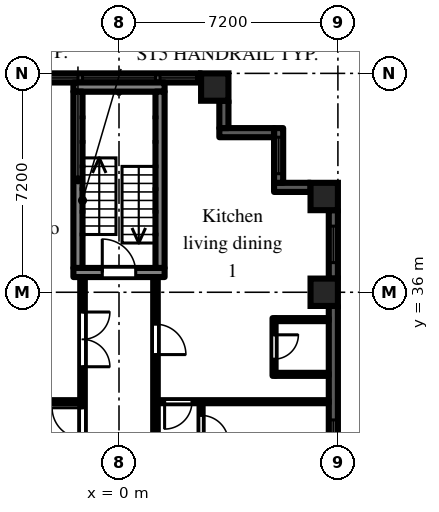
"""IFC4 building model, lengths in metres.
Left out: names, types, materials, properties, quantities, classifications, styles, units other than length and angle.
Written with IfcOpenShell. Run it as: python <this file> out.ifc"""

import sys

from ifc_helpers import new_model, si_unit, direction, frame, frame_2d, origin, origin_2d, place, context, subcontext, project, spatial, rectangle, extrude, element, fill, save


model = new_model("IFC4")
c1 = context("Model", 3, precision=1e-05, world=origin(), true_north=direction((0.0, 1.0)))
c2 = subcontext(c1, "Body", "Model", "MODEL_VIEW")
j1 = project(units=[si_unit("LENGTHUNIT", "METRE"), si_unit("PLANEANGLEUNIT", "RADIAN")], contexts=[c1])
p1 = place(None, origin())
s1 = spatial("IfcSite", under=j1, at=p1, CompositionType="ELEMENT")
p2 = place(p1, origin())
s2 = spatial("IfcBuilding", under=s1, at=p2, CompositionType="ELEMENT")
p3 = place(p2, frame((0.0, 0.0, 59.7)))
s3 = spatial("IfcBuildingStorey", under=s2, at=p3, CompositionType="ELEMENT", Elevation=59.7)
for number, where, z_axis, x_axis in (
    (1, (3.15, 42.75, 0.0), (0.0, 0.0, 1.0), (1.0, 0.0, 0.0)),
    (2, (6.75, 36.0, 0.0), (0.0, 0.0, 1.0), (1.0, 0.0, 0.0)),
    (3, (6.75, 39.15, 0.0), (0.0, 0.0, 1.0), (1.0, 0.0, 0.0)),
):
    element("IfcColumn", number, at=place(p3, frame(where, z_axis=z_axis, x_axis=x_axis)), inside=s3, PredefinedType="COLUMN", context=c2, shape_type="SweptSolid", body=[
        extrude(rectangle(XDim=0.9, YDim=0.9, at=origin_2d()), origin(), (0.0, 0.0, 1.0), 3.0),
    ])
p4 = place(p3, frame((7.05, 29.25, 0.0), z_axis=(0.0, 0.0, 1.0), x_axis=(0.0, 1.0, 0.0)))
e4 = element("IfcWall", 4, at=p4, inside=s3, PredefinedType="SOLIDWALL", context=c2, shape_type="SweptSolid", body=[
    extrude(rectangle(XDim=6.3, YDim=0.3, at=frame_2d((3.15, 0.0))), origin(), (0.0, 0.0, 1.0), 2.1),
])
p5 = place(p4, frame((0.15, 0.0, 0.2)))
e5 = element("IfcOpeningElement", 5, at=p5, cuts=e4, PredefinedType="OPENING", context=c2, shape_type="SweptSolid", body=[
    extrude(rectangle(XDim=2.4, YDim=1.85, at=frame_2d((1.2, 0.925))), frame((0.0, 0.16, 0.0), z_axis=(0.0, -1.0, 0.0), x_axis=(1.0, 0.0, 0.0)), (0.0, 0.0, 1.0), 0.32),
])
p6 = place(p3, frame((7.05, 36.45, 0.0), z_axis=(0.0, 0.0, 1.0), x_axis=(0.0, 1.0, 0.0)))
e6 = element("IfcWall", 6, at=p6, inside=s3, PredefinedType="SOLIDWALL", context=c2, shape_type="SweptSolid", body=[
    extrude(rectangle(XDim=2.25, YDim=0.3, at=frame_2d((1.125, 0.0))), origin(), (0.0, 0.0, 1.0), 2.1),
])
p7 = place(p6, frame((0.525, 0.0, 0.2)))
e7 = element("IfcOpeningElement", 7, at=p7, cuts=e6, PredefinedType="OPENING", context=c2, shape_type="SweptSolid", body=[
    extrude(rectangle(XDim=1.2, YDim=1.85, at=frame_2d((0.6, 0.925))), frame((0.0, 0.16, 0.0), z_axis=(0.0, -1.0, 0.0), x_axis=(1.0, 0.0, 0.0)), (0.0, 0.0, 1.0), 0.32),
])
p8 = place(p3, frame((6.3, 39.45, 0.0), z_axis=(0.0, 0.0, 1.0), x_axis=(-1.0, 0.0, 0.0)))
e8 = element("IfcWall", 8, at=p8, inside=s3, PredefinedType="SOLIDWALL", context=c2, shape_type="SweptSolid", body=[
    extrude(rectangle(XDim=1.2, YDim=0.3, at=frame_2d((0.6, 0.0))), origin(), (0.0, 0.0, 1.0), 2.55),
])
p9 = place(p3, frame((5.25, 39.6, 0.0), z_axis=(0.0, 0.0, 1.0), x_axis=(0.0, 1.0, 0.0)))
e9 = element("IfcWall", 9, at=p9, inside=s3, PredefinedType="SOLIDWALL", context=c2, shape_type="SweptSolid", body=[
    extrude(rectangle(XDim=1.8, YDim=0.3, at=frame_2d((0.9, 0.0))), origin(), (0.0, 0.0, 1.0), 2.55),
])
p10 = place(p9, frame((0.3, 0.0, 0.2)))
e10 = element("IfcOpeningElement", 10, at=p10, cuts=e9, PredefinedType="OPENING", context=c2, shape_type="SweptSolid", body=[
    extrude(rectangle(XDim=1.2, YDim=1.85, at=frame_2d((0.6, 0.925))), frame((0.0, 0.16, 0.0), z_axis=(0.0, -1.0, 0.0), x_axis=(1.0, 0.0, 0.0)), (0.0, 0.0, 1.0), 0.32),
])
p11 = place(p3, frame((5.1, 41.25, 0.0), z_axis=(0.0, 0.0, 1.0), x_axis=(-1.0, 0.0, 0.0)))
e11 = element("IfcWall", 11, at=p11, inside=s3, PredefinedType="SOLIDWALL", context=c2, shape_type="SweptSolid", body=[
    extrude(rectangle(XDim=1.8, YDim=0.3, at=frame_2d((0.9, 0.0))), origin(), (0.0, 0.0, 1.0), 2.55),
])
p12 = place(p3, frame((3.45, 41.4, 0.0), z_axis=(0.0, 0.0, 1.0), x_axis=(0.0, 1.0, 0.0)))
e12 = element("IfcWall", 12, at=p12, inside=s3, PredefinedType="SOLIDWALL", context=c2, shape_type="SweptSolid", body=[
    extrude(rectangle(XDim=0.9, YDim=0.3, at=frame_2d((0.45, 0.0))), origin(), (0.0, 0.0, 1.0), 2.55),
])
p13 = place(p3, frame((2.7, 43.05, 0.0), z_axis=(0.0, 0.0, 1.0), x_axis=(-1.0, 0.0, 0.0)))
e13 = element("IfcWall", 13, at=p13, inside=s3, PredefinedType="SOLIDWALL", context=c2, shape_type="SweptSolid", body=[
    extrude(rectangle(XDim=5.4, YDim=0.3, at=frame_2d((2.7, 0.0))), origin(), (0.0, 0.0, 1.0), 2.1),
])
p14 = place(p13, frame((1.5, 0.0, 0.2)))
e14 = element("IfcOpeningElement", 14, at=p14, cuts=e13, PredefinedType="OPENING", context=c2, shape_type="SweptSolid", body=[
    extrude(rectangle(XDim=2.4, YDim=1.85, at=frame_2d((1.2, 0.925))), frame((0.0, 0.16, 0.0), z_axis=(0.0, -1.0, 0.0), x_axis=(1.0, 0.0, 0.0)), (0.0, 0.0, 1.0), 0.32),
])
p15 = place(p13, frame((0.15, 0.0, 0.2)))
e15 = element("IfcOpeningElement", 15, at=p15, cuts=e13, PredefinedType="OPENING", context=c2, shape_type="SweptSolid", body=[
    extrude(rectangle(XDim=1.2, YDim=1.85, at=frame_2d((0.6, 0.925))), frame((0.0, 0.16, 0.0), z_axis=(0.0, -1.0, 0.0), x_axis=(1.0, 0.0, 0.0)), (0.0, 0.0, 1.0), 0.32),
])
p16 = place(p13, frame((4.05, 0.0, 0.2)))
e16 = element("IfcOpeningElement", 16, at=p16, cuts=e13, PredefinedType="OPENING", context=c2, shape_type="SweptSolid", body=[
    extrude(rectangle(XDim=1.2, YDim=1.85, at=frame_2d((0.6, 0.925))), frame((0.0, 0.16, 0.0), z_axis=(0.0, -1.0, 0.0), x_axis=(1.0, 0.0, 0.0)), (0.0, 0.0, 1.0), 0.32),
])
p17 = place(p3, frame((-1.5, 36.65, 0.0), z_axis=(0.0, 0.0, 1.0), x_axis=(1.0, 0.0, 0.0)))
e17 = element("IfcWall", 17, at=p17, inside=s3, PredefinedType="SHEAR", context=c2, shape_type="SweptSolid", body=[
    extrude(rectangle(XDim=3.0, YDim=0.3, at=frame_2d((1.5, 0.0))), origin(), (0.0, 0.0, 1.0), 2.55),
])
p18 = place(p17, frame((0.95, 0.0, 0.0)))
e18 = element("IfcOpeningElement", 18, at=p18, cuts=e17, PredefinedType="OPENING", context=c2, shape_type="SweptSolid", body=[
    extrude(rectangle(XDim=1.1, YDim=2.1, at=frame_2d((0.55, 1.05))), frame((0.0, 0.16, 0.0), z_axis=(0.0, -1.0, 0.0), x_axis=(1.0, 0.0, 0.0)), (0.0, 0.0, 1.0), 0.32),
])
p19 = place(p3, frame((-1.5, 42.75, 0.0), z_axis=(0.0, 0.0, 1.0), x_axis=(1.0, 0.0, 0.0)))
e19 = element("IfcWall", 19, at=p19, inside=s3, PredefinedType="SHEAR", context=c2, shape_type="SweptSolid", body=[
    extrude(rectangle(XDim=3.0, YDim=0.3, at=frame_2d((1.5, 0.0))), origin(), (0.0, 0.0, 1.0), 2.55),
])
for number, where, z_axis, x_axis in (
    (20, (-1.35, 36.8, 0.0), (0.0, 0.0, 1.0), (0.0, 1.0, 0.0)),
    (21, (1.35, 36.8, 0.0), (0.0, 0.0, 1.0), (0.0, 1.0, 0.0)),
):
    element("IfcWall", number, at=place(p3, frame(where, z_axis=z_axis, x_axis=x_axis)), inside=s3, PredefinedType="SHEAR", context=c2, shape_type="SweptSolid", body=[
        extrude(rectangle(XDim=5.8, YDim=0.3, at=frame_2d((2.9, 0.0))), origin(), (0.0, 0.0, 1.0), 2.55),
    ])
p20 = place(p3, frame((-6.9, 32.4, 0.0), z_axis=(0.0, 0.0, 1.0), x_axis=(1.0, 0.0, 0.0)))
e22 = element("IfcWall", 22, at=p20, inside=s3, PredefinedType="PARTITIONING", context=c2, shape_type="SweptSolid", body=[
    extrude(rectangle(XDim=5.625, YDim=0.1, at=frame_2d((2.812, 0.0))), origin(), (0.0, 0.0, 1.0), 2.55),
])
p21 = place(p3, frame((-1.2, 1.275, 0.0), z_axis=(0.0, 0.0, 1.0), x_axis=(0.0, 1.0, 0.0)))
e23 = element("IfcWall", 23, at=p21, inside=s3, PredefinedType="PARTITIONING", context=c2, shape_type="SweptSolid", body=[
    extrude(rectangle(XDim=35.225, YDim=0.15, at=frame_2d((17.613, 0.0))), origin(), (0.0, 0.0, 1.0), 2.55),
])
p22 = place(p21, frame((2.475, 0.0, 0.0)))
e24 = element("IfcOpeningElement", 24, at=p22, cuts=e23, PredefinedType="OPENING", context=c2, shape_type="SweptSolid", body=[
    extrude(rectangle(XDim=0.9, YDim=2.1, at=frame_2d((0.45, 1.05))), frame((0.0, 0.085, 0.0), z_axis=(0.0, -1.0, 0.0), x_axis=(1.0, 0.0, 0.0)), (0.0, 0.0, 1.0), 0.17),
])
p23 = place(p21, frame((11.275, 0.0, 0.0)))
e25 = element("IfcOpeningElement", 25, at=p23, cuts=e23, PredefinedType="OPENING", context=c2, shape_type="SweptSolid", body=[
    extrude(rectangle(XDim=0.9, YDim=2.1, at=frame_2d((0.45, 1.05))), frame((0.0, 0.085, 0.0), z_axis=(0.0, -1.0, 0.0), x_axis=(1.0, 0.0, 0.0)), (0.0, 0.0, 1.0), 0.17),
])
p24 = place(p21, frame((7.675, 0.0, 0.0)))
e26 = element("IfcOpeningElement", 26, at=p24, cuts=e23, PredefinedType="OPENING", context=c2, shape_type="SweptSolid", body=[
    extrude(rectangle(XDim=0.9, YDim=2.1, at=frame_2d((0.45, 1.05))), frame((0.0, 0.085, 0.0), z_axis=(0.0, -1.0, 0.0), x_axis=(1.0, 0.0, 0.0)), (0.0, 0.0, 1.0), 0.17),
])
p25 = place(p21, frame((19.125, 0.0, 0.0)))
e27 = element("IfcOpeningElement", 27, at=p25, cuts=e23, PredefinedType="OPENING", context=c2, shape_type="SweptSolid", body=[
    extrude(rectangle(XDim=1.0, YDim=2.1, at=frame_2d((0.5, 1.05))), frame((0.0, 0.085, 0.0), z_axis=(0.0, -1.0, 0.0), x_axis=(1.0, 0.0, 0.0)), (0.0, 0.0, 1.0), 0.17),
])
p26 = place(p21, frame((21.675, 0.0, 0.0)))
e28 = element("IfcOpeningElement", 28, at=p26, cuts=e23, PredefinedType="OPENING", context=c2, shape_type="SweptSolid", body=[
    extrude(rectangle(XDim=0.9, YDim=2.1, at=frame_2d((0.45, 1.05))), frame((0.0, 0.085, 0.0), z_axis=(0.0, -1.0, 0.0), x_axis=(1.0, 0.0, 0.0)), (0.0, 0.0, 1.0), 0.17),
])
p27 = place(p21, frame((29.925, 0.0, 0.0)))
e29 = element("IfcOpeningElement", 29, at=p27, cuts=e23, PredefinedType="OPENING", context=c2, shape_type="SweptSolid", body=[
    extrude(rectangle(XDim=1.0, YDim=2.1, at=frame_2d((0.5, 1.05))), frame((0.0, 0.085, 0.0), z_axis=(0.0, -1.0, 0.0), x_axis=(1.0, 0.0, 0.0)), (0.0, 0.0, 1.0), 0.17),
])
p28 = place(p21, frame((32.275, 0.0, 0.0)))
e30 = element("IfcOpeningElement", 30, at=p28, cuts=e23, PredefinedType="OPENING", context=c2, shape_type="SweptSolid", body=[
    extrude(rectangle(XDim=1.8, YDim=2.1, at=frame_2d((0.9, 1.05))), frame((0.0, 0.085, 0.0), z_axis=(0.0, -1.0, 0.0), x_axis=(1.0, 0.0, 0.0)), (0.0, 0.0, 1.0), 0.17),
])
p29 = place(p3, frame((1.2, 1.125, 0.0), z_axis=(0.0, 0.0, 1.0), x_axis=(0.0, 1.0, 0.0)))
e31 = element("IfcWall", 31, at=p29, inside=s3, PredefinedType="PARTITIONING", context=c2, shape_type="SweptSolid", body=[
    extrude(rectangle(XDim=35.375, YDim=0.15, at=frame_2d((17.688, 0.0))), origin(), (0.0, 0.0, 1.0), 2.55),
])
p30 = place(p29, frame((2.625, 0.0, 0.0)))
e32 = element("IfcOpeningElement", 32, at=p30, cuts=e31, PredefinedType="OPENING", context=c2, shape_type="SweptSolid", body=[
    extrude(rectangle(XDim=0.9, YDim=2.1, at=frame_2d((0.45, 1.05))), frame((0.0, 0.085, 0.0), z_axis=(0.0, -1.0, 0.0), x_axis=(1.0, 0.0, 0.0)), (0.0, 0.0, 1.0), 0.17),
])
p31 = place(p29, frame((7.425, 0.0, 0.0)))
e33 = element("IfcOpeningElement", 33, at=p31, cuts=e31, PredefinedType="OPENING", context=c2, shape_type="SweptSolid", body=[
    extrude(rectangle(XDim=0.9, YDim=2.1, at=frame_2d((0.45, 1.05))), frame((0.0, 0.085, 0.0), z_axis=(0.0, -1.0, 0.0), x_axis=(1.0, 0.0, 0.0)), (0.0, 0.0, 1.0), 0.17),
])
p32 = place(p29, frame((13.725, 0.0, 0.0)))
e34 = element("IfcOpeningElement", 34, at=p32, cuts=e31, PredefinedType="OPENING", context=c2, shape_type="SweptSolid", body=[
    extrude(rectangle(XDim=0.9, YDim=2.1, at=frame_2d((0.45, 1.05))), frame((0.0, 0.085, 0.0), z_axis=(0.0, -1.0, 0.0), x_axis=(1.0, 0.0, 0.0)), (0.0, 0.0, 1.0), 0.17),
])
p33 = place(p29, frame((15.525, 0.0, 0.0)))
e35 = element("IfcOpeningElement", 35, at=p33, cuts=e31, PredefinedType="OPENING", context=c2, shape_type="SweptSolid", body=[
    extrude(rectangle(XDim=0.9, YDim=2.1, at=frame_2d((0.45, 1.05))), frame((0.0, 0.085, 0.0), z_axis=(0.0, -1.0, 0.0), x_axis=(1.0, 0.0, 0.0)), (0.0, 0.0, 1.0), 0.17),
])
p34 = place(p29, frame((32.825, 0.0, 0.0)))
e36 = element("IfcOpeningElement", 36, at=p34, cuts=e31, PredefinedType="OPENING", context=c2, shape_type="SweptSolid", body=[
    extrude(rectangle(XDim=1.0, YDim=2.1, at=frame_2d((0.5, 1.05))), frame((0.0, 0.085, 0.0), z_axis=(0.0, -1.0, 0.0), x_axis=(1.0, 0.0, 0.0)), (0.0, 0.0, 1.0), 0.17),
])
p35 = place(p3, frame((1.275, 32.4, 0.0), z_axis=(0.0, 0.0, 1.0), x_axis=(1.0, 0.0, 0.0)))
e37 = element("IfcWall", 37, at=p35, inside=s3, PredefinedType="PARTITIONING", context=c2, shape_type="SweptSolid", body=[
    extrude(rectangle(XDim=5.625, YDim=0.1, at=frame_2d((2.812, 0.0))), origin(), (0.0, 0.0, 1.0), 2.55),
])
p36 = place(p35, frame((0.225, 0.0, 0.0)))
e38 = element("IfcOpeningElement", 38, at=p36, cuts=e37, PredefinedType="OPENING", context=c2, shape_type="SweptSolid", body=[
    extrude(rectangle(XDim=0.9, YDim=2.1, at=frame_2d((0.45, 1.05))), frame((0.0, 0.06, 0.0), z_axis=(0.0, -1.0, 0.0), x_axis=(1.0, 0.0, 0.0)), (0.0, 0.0, 1.0), 0.12),
])
p37 = place(p3, frame((2.7, 18.075, 0.0), z_axis=(0.0, 0.0, 1.0), x_axis=(0.0, 1.0, 0.0)))
e39 = element("IfcWall", 39, at=p37, inside=s3, PredefinedType="PARTITIONING", context=c2, shape_type="SweptSolid", body=[
    extrude(rectangle(XDim=14.275, YDim=0.1, at=frame_2d((7.138, 0.0))), origin(), (0.0, 0.0, 1.0), 2.55),
])
p38 = place(p37, frame((0.375, 0.0, 0.0)))
e40 = element("IfcOpeningElement", 40, at=p38, cuts=e39, PredefinedType="OPENING", context=c2, shape_type="SweptSolid", body=[
    extrude(rectangle(XDim=0.9, YDim=2.1, at=frame_2d((0.45, 1.05))), frame((0.0, 0.06, 0.0), z_axis=(0.0, -1.0, 0.0), x_axis=(1.0, 0.0, 0.0)), (0.0, 0.0, 1.0), 0.12),
])
p39 = place(p37, frame((5.775, 0.0, 0.0)))
e41 = element("IfcOpeningElement", 41, at=p39, cuts=e39, PredefinedType="OPENING", context=c2, shape_type="SweptSolid", body=[
    extrude(rectangle(XDim=0.9, YDim=2.1, at=frame_2d((0.45, 1.05))), frame((0.0, 0.06, 0.0), z_axis=(0.0, -1.0, 0.0), x_axis=(1.0, 0.0, 0.0)), (0.0, 0.0, 1.0), 0.12),
])
p40 = place(p37, frame((7.575, 0.0, 0.0)))
e42 = element("IfcOpeningElement", 42, at=p40, cuts=e39, PredefinedType="OPENING", context=c2, shape_type="SweptSolid", body=[
    extrude(rectangle(XDim=0.9, YDim=2.1, at=frame_2d((0.45, 1.05))), frame((0.0, 0.06, 0.0), z_axis=(0.0, -1.0, 0.0), x_axis=(1.0, 0.0, 0.0)), (0.0, 0.0, 1.0), 0.12),
])
p41 = place(p37, frame((12.975, 0.0, 0.0)))
e43 = element("IfcOpeningElement", 43, at=p41, cuts=e39, PredefinedType="OPENING", context=c2, shape_type="SweptSolid", body=[
    extrude(rectangle(XDim=0.9, YDim=2.1, at=frame_2d((0.45, 1.05))), frame((0.0, 0.06, 0.0), z_axis=(0.0, -1.0, 0.0), x_axis=(1.0, 0.0, 0.0)), (0.0, 0.0, 1.0), 0.12),
])
p42 = place(p3, frame((5.1, 33.25, 0.0), z_axis=(0.0, 0.0, 1.0), x_axis=(0.0, 1.0, 0.0)))
e44 = element("IfcWall", 44, at=p42, inside=s3, PredefinedType="PARTITIONING", context=c2, shape_type="SweptSolid", body=[
    extrude(rectangle(XDim=1.9, YDim=0.1, at=frame_2d((0.95, 0.0))), origin(), (0.0, 0.0, 1.0), 2.55),
])
p43 = place(p42, frame((0.55, 0.0, 0.0)))
e45 = element("IfcOpeningElement", 45, at=p43, cuts=e44, PredefinedType="OPENING", context=c2, shape_type="SweptSolid", body=[
    extrude(rectangle(XDim=0.8, YDim=2.1, at=frame_2d((0.4, 1.05))), frame((0.0, 0.06, 0.0), z_axis=(0.0, -1.0, 0.0), x_axis=(1.0, 0.0, 0.0)), (0.0, 0.0, 1.0), 0.12),
])
for number, where, z_axis, x_axis in (
    (46, (5.15, 33.3, 0.0), (0.0, 0.0, 1.0), (1.0, 0.0, 0.0)),
    (47, (5.15, 35.1, 0.0), (0.0, 0.0, 1.0), (1.0, 0.0, 0.0)),
):
    element("IfcWall", number, at=place(p3, frame(where, z_axis=z_axis, x_axis=x_axis)), inside=s3, PredefinedType="PARTITIONING", context=c2, shape_type="SweptSolid", body=[
        extrude(rectangle(XDim=1.75, YDim=0.1, at=frame_2d((0.875, 0.0))), origin(), (0.0, 0.0, 1.0), 2.55),
    ])
p44 = place(p5, origin())
e48 = element("IfcWindow", 48, at=p44, inside=s3, PartitioningType="SINGLE_PANEL", PredefinedType="WINDOW", context=c2, shape_type="SweptSolid", body=[
    extrude(rectangle(XDim=2.4, YDim=1.85, at=frame_2d((1.2, 0.925))), frame((0.0, 0.03, 0.0), z_axis=(0.0, -1.0, 0.0), x_axis=(1.0, 0.0, 0.0)), (0.0, 0.0, 1.0), 0.06),
])
fill(e5, e48)
p45 = place(p7, origin())
e49 = element("IfcWindow", 49, at=p45, inside=s3, PartitioningType="SINGLE_PANEL", PredefinedType="WINDOW", context=c2, shape_type="SweptSolid", body=[
    extrude(rectangle(XDim=1.2, YDim=1.85, at=frame_2d((0.6, 0.925))), frame((0.0, 0.03, 0.0), z_axis=(0.0, -1.0, 0.0), x_axis=(1.0, 0.0, 0.0)), (0.0, 0.0, 1.0), 0.06),
])
fill(e7, e49)
p46 = place(p10, origin())
e50 = element("IfcWindow", 50, at=p46, inside=s3, PartitioningType="SINGLE_PANEL", PredefinedType="WINDOW", context=c2, shape_type="SweptSolid", body=[
    extrude(rectangle(XDim=1.2, YDim=1.85, at=frame_2d((0.6, 0.925))), frame((0.0, 0.03, 0.0), z_axis=(0.0, -1.0, 0.0), x_axis=(1.0, 0.0, 0.0)), (0.0, 0.0, 1.0), 0.06),
])
fill(e10, e50)
p47 = place(p14, origin())
e51 = element("IfcWindow", 51, at=p47, inside=s3, PartitioningType="SINGLE_PANEL", PredefinedType="WINDOW", context=c2, shape_type="SweptSolid", body=[
    extrude(rectangle(XDim=2.4, YDim=1.85, at=frame_2d((1.2, 0.925))), frame((0.0, 0.03, 0.0), z_axis=(0.0, -1.0, 0.0), x_axis=(1.0, 0.0, 0.0)), (0.0, 0.0, 1.0), 0.06),
])
fill(e14, e51)
p48 = place(p15, origin())
e52 = element("IfcWindow", 52, at=p48, inside=s3, PartitioningType="SINGLE_PANEL", PredefinedType="WINDOW", context=c2, shape_type="SweptSolid", body=[
    extrude(rectangle(XDim=1.2, YDim=1.85, at=frame_2d((0.6, 0.925))), frame((0.0, 0.03, 0.0), z_axis=(0.0, -1.0, 0.0), x_axis=(1.0, 0.0, 0.0)), (0.0, 0.0, 1.0), 0.06),
])
fill(e15, e52)
p49 = place(p16, origin())
e53 = element("IfcWindow", 53, at=p49, inside=s3, PartitioningType="SINGLE_PANEL", PredefinedType="WINDOW", context=c2, shape_type="SweptSolid", body=[
    extrude(rectangle(XDim=1.2, YDim=1.85, at=frame_2d((0.6, 0.925))), frame((0.0, 0.03, 0.0), z_axis=(0.0, -1.0, 0.0), x_axis=(1.0, 0.0, 0.0)), (0.0, 0.0, 1.0), 0.06),
])
fill(e16, e53)
p50 = place(p18, origin())
e54 = element("IfcDoor", 54, at=p50, inside=s3, OperationType="SINGLE_SWING_LEFT", PredefinedType="DOOR", context=c2, shape_type="SweptSolid", body=[
    extrude(rectangle(XDim=1.1, YDim=2.1, at=frame_2d((0.55, 1.05))), frame((0.0, 0.025, 0.0), z_axis=(0.0, -1.0, 0.0), x_axis=(1.0, 0.0, 0.0)), (0.0, 0.0, 1.0), 0.05),
])
fill(e18, e54)
p51 = place(p27, origin())
e55 = element("IfcDoor", 55, at=p51, inside=s3, OperationType="SINGLE_SWING_RIGHT", PredefinedType="DOOR", context=c2, shape_type="SweptSolid", body=[
    extrude(rectangle(XDim=1.0, YDim=2.1, at=frame_2d((0.5, 1.05))), frame((0.0, 0.025, 0.0), z_axis=(0.0, -1.0, 0.0), x_axis=(1.0, 0.0, 0.0)), (0.0, 0.0, 1.0), 0.05),
])
fill(e29, e55)
p52 = place(p28, frame((1.8, 0.0, 0.0), z_axis=(0.0, 0.0, 1.0), x_axis=(-1.0, 0.0, 0.0)))
e56 = element("IfcDoor", 56, at=p52, inside=s3, OperationType="DOUBLE_DOOR_DOUBLE_SWING", PredefinedType="DOOR", context=c2, shape_type="SweptSolid", body=[
    extrude(rectangle(XDim=1.8, YDim=2.1, at=frame_2d((0.9, 1.05))), frame((0.0, 0.025, 0.0), z_axis=(0.0, -1.0, 0.0), x_axis=(1.0, 0.0, 0.0)), (0.0, 0.0, 1.0), 0.05),
])
fill(e30, e56)
p53 = place(p43, frame((0.8, 0.0, 0.0), z_axis=(0.0, 0.0, 1.0), x_axis=(-1.0, 0.0, 0.0)))
e57 = element("IfcDoor", 57, at=p53, inside=s3, OperationType="SINGLE_SWING_LEFT", PredefinedType="DOOR", context=c2, shape_type="SweptSolid", body=[
    extrude(rectangle(XDim=0.8, YDim=2.1, at=frame_2d((0.4, 1.05))), frame((0.0, 0.025, 0.0), z_axis=(0.0, -1.0, 0.0), x_axis=(1.0, 0.0, 0.0)), (0.0, 0.0, 1.0), 0.05),
])
fill(e45, e57)
p54 = place(p34, frame((1.0, 0.0, 0.0), z_axis=(0.0, 0.0, 1.0), x_axis=(-1.0, 0.0, 0.0)))
e58 = element("IfcDoor", 58, at=p54, inside=s3, OperationType="SINGLE_SWING_RIGHT", PredefinedType="DOOR", context=c2, shape_type="SweptSolid", body=[
    extrude(rectangle(XDim=1.0, YDim=2.1, at=frame_2d((0.5, 1.05))), frame((0.0, 0.025, 0.0), z_axis=(0.0, -1.0, 0.0), x_axis=(1.0, 0.0, 0.0)), (0.0, 0.0, 1.0), 0.05),
])
fill(e36, e58)
p55 = place(p36, frame((0.9, 0.0, 0.0), z_axis=(0.0, 0.0, 1.0), x_axis=(-1.0, 0.0, 0.0)))
e59 = element("IfcDoor", 59, at=p55, inside=s3, OperationType="SINGLE_SWING_RIGHT", PredefinedType="DOOR", context=c2, shape_type="SweptSolid", body=[
    extrude(rectangle(XDim=0.9, YDim=2.1, at=frame_2d((0.45, 1.05))), frame((0.0, 0.025, 0.0), z_axis=(0.0, -1.0, 0.0), x_axis=(1.0, 0.0, 0.0)), (0.0, 0.0, 1.0), 0.05),
])
fill(e38, e59)
p56 = place(p41, frame((0.9, 0.0, 0.0), z_axis=(0.0, 0.0, 1.0), x_axis=(-1.0, 0.0, 0.0)))
e60 = element("IfcDoor", 60, at=p56, inside=s3, OperationType="SINGLE_SWING_RIGHT", PredefinedType="DOOR", context=c2, shape_type="SweptSolid", body=[
    extrude(rectangle(XDim=0.9, YDim=2.1, at=frame_2d((0.45, 1.05))), frame((0.0, 0.025, 0.0), z_axis=(0.0, -1.0, 0.0), x_axis=(1.0, 0.0, 0.0)), (0.0, 0.0, 1.0), 0.05),
])
fill(e43, e60)
save(model, sys.argv[1])
